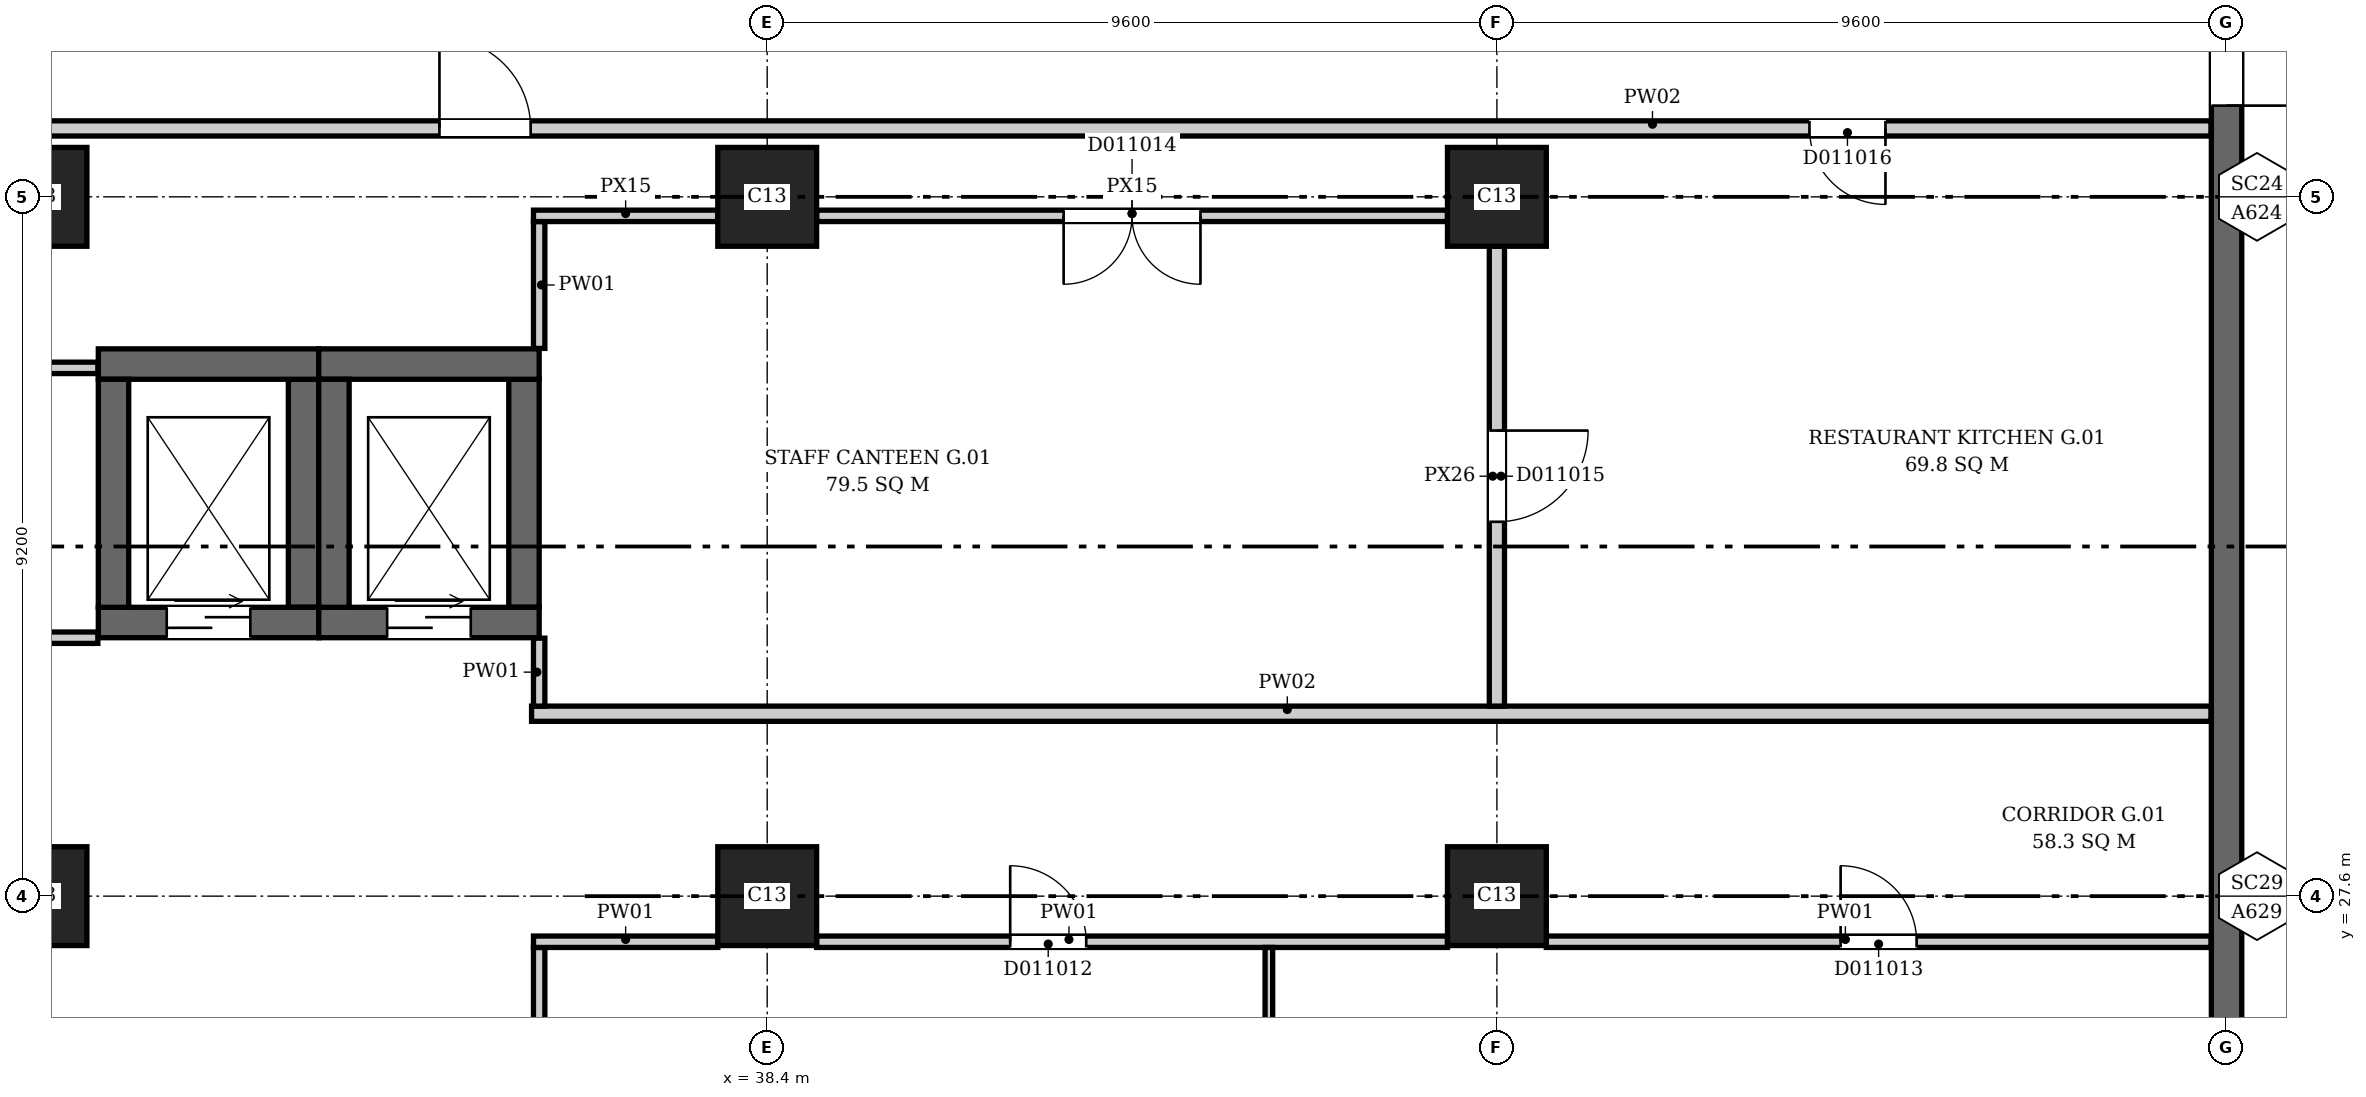
"""IFC4 building model, lengths in metres.
Left out: names, types, materials, properties, quantities, classifications, styles, units other than length and angle.
Written with IfcOpenShell. Run it as: python <this file> out.ifc"""

import sys

from ifc_helpers import new_model, si_unit, direction, frame, frame_2d, origin, origin_2d, place, context, subcontext, project, spatial, rectangle, extrude, element, fill, save


model = new_model("IFC4")
c1 = context("Model", 3, precision=1e-05, world=origin(), true_north=direction((0.0, 1.0)))
c2 = subcontext(c1, "Body", "Model", "MODEL_VIEW")
j1 = project(units=[si_unit("LENGTHUNIT", "METRE"), si_unit("PLANEANGLEUNIT", "RADIAN")], contexts=[c1])
p1 = place(None, origin())
s1 = spatial("IfcSite", under=j1, at=p1, CompositionType="ELEMENT")
p2 = place(p1, origin())
s2 = spatial("IfcBuilding", under=s1, at=p2, CompositionType="ELEMENT")
p3 = place(p2, origin())
s3 = spatial("IfcBuildingStorey", under=s2, at=p3, CompositionType="ELEMENT", Elevation=0.0)
p4 = place(p3, frame((57.6, -0.2, 0.0), z_axis=(0.0, 0.0, 1.0), x_axis=(0.0, 1.0, 0.0)))
e1 = element("IfcWall", 1, at=p4, inside=s3, PredefinedType="SHEAR", context=c2, shape_type="SweptSolid", body=[
    extrude(rectangle(XDim=46.88, YDim=0.4, at=frame_2d((23.44, 0.0))), origin(), (0.0, 0.0, 1.0), 6.5),
])
p5 = place(p4, frame((11.65, 0.0, 0.0)))
e2 = element("IfcOpeningElement", 2, at=p5, cuts=e1, PredefinedType="OPENING", context=c2, shape_type="SweptSolid", body=[
    extrude(rectangle(XDim=3.0, YDim=2.4, at=frame_2d((1.5, 1.2))), frame((0.0, 0.21, 0.0), z_axis=(0.0, -1.0, 0.0), x_axis=(1.0, 0.0, 0.0)), (0.0, 0.0, 1.0), 0.42),
])
p6 = place(p4, frame((38.2, 0.0, 0.0)))
e3 = element("IfcOpeningElement", 3, at=p6, cuts=e1, PredefinedType="OPENING", context=c2, shape_type="SweptSolid", body=[
    extrude(rectangle(XDim=3.0, YDim=2.4, at=frame_2d((1.5, 1.2))), frame((0.0, 0.21, 0.0), z_axis=(0.0, -1.0, 0.0), x_axis=(1.0, 0.0, 0.0)), (0.0, 0.0, 1.0), 0.42),
])
p7 = place(p3, frame((29.6, 31.2, 0.0), z_axis=(0.0, 0.0, 1.0), x_axis=(1.0, 0.0, 0.0)))
e4 = element("IfcWall", 4, at=p7, inside=s3, PredefinedType="SHEAR", context=c2, shape_type="SweptSolid", body=[
    extrude(rectangle(XDim=2.9, YDim=0.4, at=frame_2d((1.45, 0.0))), origin(), (0.0, 0.0, 1.0), 6.5),
])
p8 = place(p7, frame((0.9, 0.0, 0.0)))
e5 = element("IfcOpeningElement", 5, at=p8, cuts=e4, PredefinedType="OPENING", context=c2, shape_type="SweptSolid", body=[
    extrude(rectangle(XDim=1.1, YDim=2.1, at=frame_2d((0.55, 1.05))), frame((0.0, 0.21, 0.0), z_axis=(0.0, -1.0, 0.0), x_axis=(1.0, 0.0, 0.0)), (0.0, 0.0, 1.0), 0.42),
])
p9 = place(p3, frame((29.6, 34.6, 0.0), z_axis=(0.0, 0.0, 1.0), x_axis=(1.0, 0.0, 0.0)))
e6 = element("IfcWall", 6, at=p9, inside=s3, PredefinedType="SHEAR", context=c2, shape_type="SweptSolid", body=[
    extrude(rectangle(XDim=2.9, YDim=0.4, at=frame_2d((1.45, 0.0))), origin(), (0.0, 0.0, 1.0), 6.5),
])
for number, where, z_axis, x_axis in (
    (7, (29.8, 31.4, 0.0), (0.0, 0.0, 1.0), (0.0, 1.0, 0.0)),
    (8, (32.3, 31.4, 0.0), (0.0, 0.0, 1.0), (0.0, 1.0, 0.0)),
):
    element("IfcWall", number, at=place(p3, frame(where, z_axis=z_axis, x_axis=x_axis)), inside=s3, PredefinedType="SHEAR", context=c2, shape_type="SweptSolid", body=[
        extrude(rectangle(XDim=3.0, YDim=0.4, at=frame_2d((1.5, 0.0))), origin(), (0.0, 0.0, 1.0), 6.5),
    ])
p10 = place(p3, frame((32.5, 31.2, 0.0), z_axis=(0.0, 0.0, 1.0), x_axis=(1.0, 0.0, 0.0)))
e9 = element("IfcWall", 9, at=p10, inside=s3, PredefinedType="SHEAR", context=c2, shape_type="SweptSolid", body=[
    extrude(rectangle(XDim=2.9, YDim=0.4, at=frame_2d((1.45, 0.0))), origin(), (0.0, 0.0, 1.0), 6.5),
])
p11 = place(p10, frame((0.9, 0.0, 0.0)))
e10 = element("IfcOpeningElement", 10, at=p11, cuts=e9, PredefinedType="OPENING", context=c2, shape_type="SweptSolid", body=[
    extrude(rectangle(XDim=1.1, YDim=2.1, at=frame_2d((0.55, 1.05))), frame((0.0, 0.21, 0.0), z_axis=(0.0, -1.0, 0.0), x_axis=(1.0, 0.0, 0.0)), (0.0, 0.0, 1.0), 0.42),
])
p12 = place(p3, frame((32.5, 34.6, 0.0), z_axis=(0.0, 0.0, 1.0), x_axis=(1.0, 0.0, 0.0)))
e11 = element("IfcWall", 11, at=p12, inside=s3, PredefinedType="SHEAR", context=c2, shape_type="SweptSolid", body=[
    extrude(rectangle(XDim=2.9, YDim=0.4, at=frame_2d((1.45, 0.0))), origin(), (0.0, 0.0, 1.0), 6.5),
])
for number, where, z_axis, x_axis in (
    (12, (32.7, 31.4, 0.0), (0.0, 0.0, 1.0), (0.0, 1.0, 0.0)),
    (13, (35.2, 31.4, 0.0), (0.0, 0.0, 1.0), (0.0, 1.0, 0.0)),
):
    element("IfcWall", number, at=place(p3, frame(where, z_axis=z_axis, x_axis=x_axis)), inside=s3, PredefinedType="SHEAR", context=c2, shape_type="SweptSolid", body=[
        extrude(rectangle(XDim=3.0, YDim=0.4, at=frame_2d((1.5, 0.0))), origin(), (0.0, 0.0, 1.0), 6.5),
    ])
for number, where, z_axis, x_axis in (
    (14, (28.8, 27.6, 0.0), (0.0, 0.0, 1.0), (1.0, 0.0, 0.0)),
    (15, (38.4, 27.6, 0.0), (0.0, 0.0, 1.0), (1.0, 0.0, 0.0)),
    (16, (48.0, 27.6, 0.0), (0.0, 0.0, 1.0), (1.0, 0.0, 0.0)),
    (17, (28.8, 36.8, 0.0), (0.0, 0.0, 1.0), (1.0, 0.0, 0.0)),
    (18, (38.4, 36.8, 0.0), (0.0, 0.0, 1.0), (1.0, 0.0, 0.0)),
    (19, (48.0, 36.8, 0.0), (0.0, 0.0, 1.0), (1.0, 0.0, 0.0)),
):
    element("IfcColumn", number, at=place(p3, frame(where, z_axis=z_axis, x_axis=x_axis)), inside=s3, PredefinedType="COLUMN", context=c2, shape_type="SweptSolid", body=[
        extrude(rectangle(XDim=1.3, YDim=1.3, at=origin_2d()), origin(), (0.0, 0.0, 1.0), 6.5),
    ])
p13 = place(p3, frame((14.475, 31.0, 0.0), z_axis=(0.0, 0.0, 1.0), x_axis=(1.0, 0.0, 0.0)))
e20 = element("IfcWall", 20, at=p13, inside=s3, PredefinedType="PARTITIONING", context=c2, shape_type="SweptSolid", body=[
    extrude(rectangle(XDim=15.119, YDim=0.15, at=frame_2d((7.56, 0.0))), origin(), (0.0, 0.0, 1.0), 6.15),
])
p14 = place(p3, frame((14.475, 34.55, 0.0), z_axis=(0.0, 0.0, 1.0), x_axis=(1.0, 0.0, 0.0)))
e21 = element("IfcWall", 21, at=p14, inside=s3, PredefinedType="PARTITIONING", context=c2, shape_type="SweptSolid", body=[
    extrude(rectangle(XDim=15.119, YDim=0.15, at=frame_2d((7.56, 0.0))), origin(), (0.0, 0.0, 1.0), 6.15),
])
p15 = place(p14, frame((7.06, 0.0, 0.0)))
e22 = element("IfcOpeningElement", 22, at=p15, cuts=e21, PredefinedType="OPENING", context=c2, shape_type="SweptSolid", body=[
    extrude(rectangle(XDim=1.0, YDim=2.1, at=frame_2d((0.5, 1.05))), frame((0.0, 0.085, 0.0), z_axis=(0.0, -1.0, 0.0), x_axis=(1.0, 0.0, 0.0)), (0.0, 0.0, 1.0), 0.17),
])
p16 = place(p3, frame((28.006, 37.7, 0.0), z_axis=(0.0, 0.0, 1.0), x_axis=(1.0, 0.0, 0.0)))
e23 = element("IfcWall", 23, at=p16, inside=s3, PredefinedType="PARTITIONING", context=c2, shape_type="SweptSolid", body=[
    extrude(rectangle(XDim=29.388, YDim=0.2, at=frame_2d((14.694, 0.0))), origin(), (0.0, 0.0, 1.0), 6.15),
])
p17 = place(p16, frame((24.106, 0.0, 0.0)))
e24 = element("IfcOpeningElement", 24, at=p17, cuts=e23, PredefinedType="OPENING", context=c2, shape_type="SweptSolid", body=[
    extrude(rectangle(XDim=1.0, YDim=2.1, at=frame_2d((0.5, 1.05))), frame((0.0, 0.11, 0.0), z_axis=(0.0, -1.0, 0.0), x_axis=(1.0, 0.0, 0.0)), (0.0, 0.0, 1.0), 0.22),
])
p18 = place(p16, frame((6.082, 0.0, 0.0)))
e25 = element("IfcOpeningElement", 25, at=p18, cuts=e23, PredefinedType="OPENING", context=c2, shape_type="SweptSolid", body=[
    extrude(rectangle(XDim=1.2, YDim=2.1, at=frame_2d((0.6, 1.05))), frame((0.0, 0.11, 0.0), z_axis=(0.0, -1.0, 0.0), x_axis=(1.0, 0.0, 0.0)), (0.0, 0.0, 1.0), 0.22),
])
p19 = place(p3, frame((35.3, 30.0, 0.0), z_axis=(0.0, 0.0, 1.0), x_axis=(1.0, 0.0, 0.0)))
e26 = element("IfcWall", 26, at=p19, inside=s3, PredefinedType="PARTITIONING", context=c2, shape_type="SweptSolid", body=[
    extrude(rectangle(XDim=22.094, YDim=0.2, at=frame_2d((11.047, 0.0))), origin(), (0.0, 0.0, 1.0), 6.15),
])
p20 = place(p3, frame((35.4, 16.075, 0.0), z_axis=(0.0, 0.0, 1.0), x_axis=(0.0, 1.0, 0.0)))
e27 = element("IfcWall", 27, at=p20, inside=s3, PredefinedType="PARTITIONING", context=c2, shape_type="SweptSolid", body=[
    extrude(rectangle(XDim=10.85, YDim=0.15, at=frame_2d((5.425, 0.0))), origin(), (0.0, 0.0, 1.0), 6.15),
])
p21 = place(p3, frame((35.325, 27.0, 0.0), z_axis=(0.0, 0.0, 1.0), x_axis=(1.0, 0.0, 0.0)))
e28 = element("IfcWall", 28, at=p21, inside=s3, PredefinedType="PARTITIONING", context=c2, shape_type="SweptSolid", body=[
    extrude(rectangle(XDim=2.425, YDim=0.15, at=frame_2d((1.212, 0.0))), origin(), (0.0, 0.0, 1.0), 6.15),
])
p22 = place(p3, frame((35.4, 30.1, 0.0), z_axis=(0.0, 0.0, 1.0), x_axis=(0.0, 1.0, 0.0)))
e29 = element("IfcWall", 29, at=p22, inside=s3, PredefinedType="PARTITIONING", context=c2, shape_type="SweptSolid", body=[
    extrude(rectangle(XDim=0.894, YDim=0.15, at=frame_2d((0.447, 0.0))), origin(), (0.0, 0.0, 1.0), 6.15),
])
p23 = place(p3, frame((35.4, 34.806, 0.0), z_axis=(0.0, 0.0, 1.0), x_axis=(0.0, 1.0, 0.0)))
e30 = element("IfcWall", 30, at=p23, inside=s3, PredefinedType="PARTITIONING", context=c2, shape_type="SweptSolid", body=[
    extrude(rectangle(XDim=1.669, YDim=0.15, at=frame_2d((0.834, 0.0))), origin(), (0.0, 0.0, 1.0), 6.15),
])
p24 = place(p3, frame((35.325, 36.55, 0.0), z_axis=(0.0, 0.0, 1.0), x_axis=(1.0, 0.0, 0.0)))
e31 = element("IfcWall", 31, at=p24, inside=s3, PredefinedType="PARTITIONING", context=c2, shape_type="SweptSolid", body=[
    extrude(rectangle(XDim=2.425, YDim=0.15, at=frame_2d((1.212, 0.0))), origin(), (0.0, 0.0, 1.0), 5.75),
])
p25 = place(p3, frame((39.05, 27.0, 0.0), z_axis=(0.0, 0.0, 1.0), x_axis=(1.0, 0.0, 0.0)))
e32 = element("IfcWall", 32, at=p25, inside=s3, PredefinedType="PARTITIONING", context=c2, shape_type="SweptSolid", body=[
    extrude(rectangle(XDim=8.3, YDim=0.15, at=frame_2d((4.15, 0.0))), origin(), (0.0, 0.0, 1.0), 6.15),
])
p26 = place(p25, frame((2.547, 0.0, 0.0)))
e33 = element("IfcOpeningElement", 33, at=p26, cuts=e32, PredefinedType="OPENING", context=c2, shape_type="SweptSolid", body=[
    extrude(rectangle(XDim=1.0, YDim=2.1, at=frame_2d((0.5, 1.05))), frame((0.0, 0.085, 0.0), z_axis=(0.0, -1.0, 0.0), x_axis=(1.0, 0.0, 0.0)), (0.0, 0.0, 1.0), 0.17),
])
p27 = place(p3, frame((39.05, 36.55, 0.0), z_axis=(0.0, 0.0, 1.0), x_axis=(1.0, 0.0, 0.0)))
e34 = element("IfcWall", 34, at=p27, inside=s3, PredefinedType="PARTITIONING", context=c2, shape_type="SweptSolid", body=[
    extrude(rectangle(XDim=8.3, YDim=0.15, at=frame_2d((4.15, 0.0))), origin(), (0.0, 0.0, 1.0), 5.75),
])
p28 = place(p27, frame((3.25, 0.0, 0.0)))
e35 = element("IfcOpeningElement", 35, at=p28, cuts=e34, PredefinedType="OPENING", context=c2, shape_type="SweptSolid", body=[
    extrude(rectangle(XDim=1.8, YDim=2.1, at=frame_2d((0.9, 1.05))), frame((0.0, 0.085, 0.0), z_axis=(0.0, -1.0, 0.0), x_axis=(1.0, 0.0, 0.0)), (0.0, 0.0, 1.0), 0.17),
])
p29 = place(p3, frame((45.0, 16.075, 0.0), z_axis=(0.0, 0.0, 1.0), x_axis=(0.0, 1.0, 0.0)))
e36 = element("IfcWall", 36, at=p29, inside=s3, PredefinedType="PARTITIONING", context=c2, shape_type="SweptSolid", body=[
    extrude(rectangle(XDim=10.85, YDim=0.1, at=frame_2d((5.425, 0.0))), origin(), (0.0, 0.0, 1.0), 6.15),
])
p30 = place(p3, frame((48.0, 30.1, 0.0), z_axis=(0.0, 0.0, 1.0), x_axis=(0.0, 1.0, 0.0)))
e37 = element("IfcWall", 37, at=p30, inside=s3, PredefinedType="PARTITIONING", context=c2, shape_type="SweptSolid", body=[
    extrude(rectangle(XDim=6.05, YDim=0.2, at=frame_2d((3.025, 0.0))), origin(), (0.0, 0.0, 1.0), 5.75),
])
p31 = place(p30, frame((2.425, 0.0, 0.0)))
e38 = element("IfcOpeningElement", 38, at=p31, cuts=e37, PredefinedType="OPENING", context=c2, shape_type="SweptSolid", body=[
    extrude(rectangle(XDim=1.2, YDim=2.1, at=frame_2d((0.6, 1.05))), frame((0.0, 0.11, 0.0), z_axis=(0.0, -1.0, 0.0), x_axis=(1.0, 0.0, 0.0)), (0.0, 0.0, 1.0), 0.22),
])
p32 = place(p3, frame((48.65, 27.0, 0.0), z_axis=(0.0, 0.0, 1.0), x_axis=(1.0, 0.0, 0.0)))
e39 = element("IfcWall", 39, at=p32, inside=s3, PredefinedType="PARTITIONING", context=c2, shape_type="SweptSolid", body=[
    extrude(rectangle(XDim=8.744, YDim=0.15, at=frame_2d((4.372, 0.0))), origin(), (0.0, 0.0, 1.0), 6.15),
])
p33 = place(p32, frame((3.872, 0.0, 0.0)))
e40 = element("IfcOpeningElement", 40, at=p33, cuts=e39, PredefinedType="OPENING", context=c2, shape_type="SweptSolid", body=[
    extrude(rectangle(XDim=1.0, YDim=2.1, at=frame_2d((0.5, 1.05))), frame((0.0, 0.085, 0.0), z_axis=(0.0, -1.0, 0.0), x_axis=(1.0, 0.0, 0.0)), (0.0, 0.0, 1.0), 0.17),
])
p34 = place(p6, frame((3.0, 0.0, 0.0), z_axis=(0.0, 0.0, 1.0), x_axis=(-1.0, 0.0, 0.0)))
e41 = element("IfcDoor", 41, at=p34, inside=s3, OperationType="DOUBLE_DOOR_SINGLE_SWING", PredefinedType="DOOR", context=c2, shape_type="SweptSolid", body=[
    extrude(rectangle(XDim=3.0, YDim=2.4, at=frame_2d((1.5, 1.2))), frame((0.0, 0.025, 0.0), z_axis=(0.0, -1.0, 0.0), x_axis=(1.0, 0.0, 0.0)), (0.0, 0.0, 1.0), 0.05),
])
fill(e3, e41)
p35 = place(p8, origin())
e42 = element("IfcDoor", 42, at=p35, inside=s3, OperationType="DOUBLE_DOOR_SLIDING", PredefinedType="DOOR", context=c2, shape_type="SweptSolid", body=[
    extrude(rectangle(XDim=1.1, YDim=2.1, at=frame_2d((0.55, 1.05))), frame((0.0, 0.025, 0.0), z_axis=(0.0, -1.0, 0.0), x_axis=(1.0, 0.0, 0.0)), (0.0, 0.0, 1.0), 0.05),
])
fill(e5, e42)
p36 = place(p11, origin())
e43 = element("IfcDoor", 43, at=p36, inside=s3, OperationType="DOUBLE_DOOR_SLIDING", PredefinedType="DOOR", context=c2, shape_type="SweptSolid", body=[
    extrude(rectangle(XDim=1.1, YDim=2.1, at=frame_2d((0.55, 1.05))), frame((0.0, 0.025, 0.0), z_axis=(0.0, -1.0, 0.0), x_axis=(1.0, 0.0, 0.0)), (0.0, 0.0, 1.0), 0.05),
])
fill(e10, e43)
p37 = place(p26, origin())
e44 = element("IfcDoor", 44, at=p37, inside=s3, OperationType="SINGLE_SWING_LEFT", PredefinedType="DOOR", context=c2, shape_type="SweptSolid", body=[
    extrude(rectangle(XDim=1.0, YDim=2.1, at=frame_2d((0.5, 1.05))), frame((0.0, 0.025, 0.0), z_axis=(0.0, -1.0, 0.0), x_axis=(1.0, 0.0, 0.0)), (0.0, 0.0, 1.0), 0.05),
])
fill(e33, e44)
p38 = place(p33, origin())
e45 = element("IfcDoor", 45, at=p38, inside=s3, OperationType="SINGLE_SWING_LEFT", PredefinedType="DOOR", context=c2, shape_type="SweptSolid", body=[
    extrude(rectangle(XDim=1.0, YDim=2.1, at=frame_2d((0.5, 1.05))), frame((0.0, 0.025, 0.0), z_axis=(0.0, -1.0, 0.0), x_axis=(1.0, 0.0, 0.0)), (0.0, 0.0, 1.0), 0.05),
])
fill(e40, e45)
p39 = place(p28, origin())
e46 = element("IfcDoor", 46, at=p39, inside=s3, OperationType="DOUBLE_DOOR_SINGLE_SWING", PredefinedType="DOOR", context=c2, shape_type="SweptSolid", body=[
    extrude(rectangle(XDim=1.8, YDim=2.1, at=frame_2d((0.9, 1.05))), frame((0.0, 0.025, 0.0), z_axis=(0.0, -1.0, 0.0), x_axis=(1.0, 0.0, 0.0)), (0.0, 0.0, 1.0), 0.05),
])
fill(e35, e46)
p40 = place(p31, origin())
e47 = element("IfcDoor", 47, at=p40, inside=s3, OperationType="SINGLE_SWING_RIGHT", PredefinedType="DOOR", context=c2, shape_type="SweptSolid", body=[
    extrude(rectangle(XDim=1.2, YDim=2.1, at=frame_2d((0.6, 1.05))), frame((0.0, 0.025, 0.0), z_axis=(0.0, -1.0, 0.0), x_axis=(1.0, 0.0, 0.0)), (0.0, 0.0, 1.0), 0.05),
])
fill(e38, e47)
p41 = place(p17, origin())
e48 = element("IfcDoor", 48, at=p41, inside=s3, OperationType="SINGLE_SWING_RIGHT", PredefinedType="DOOR", context=c2, shape_type="SweptSolid", body=[
    extrude(rectangle(XDim=1.0, YDim=2.1, at=frame_2d((0.5, 1.05))), frame((0.0, 0.025, 0.0), z_axis=(0.0, -1.0, 0.0), x_axis=(1.0, 0.0, 0.0)), (0.0, 0.0, 1.0), 0.05),
])
fill(e24, e48)
p42 = place(p18, origin())
e49 = element("IfcDoor", 49, at=p42, inside=s3, OperationType="SINGLE_SWING_LEFT", PredefinedType="DOOR", context=c2, shape_type="SweptSolid", body=[
    extrude(rectangle(XDim=1.2, YDim=2.1, at=frame_2d((0.6, 1.05))), frame((0.0, 0.025, 0.0), z_axis=(0.0, -1.0, 0.0), x_axis=(1.0, 0.0, 0.0)), (0.0, 0.0, 1.0), 0.05),
])
fill(e25, e49)
save(model, sys.argv[1])
